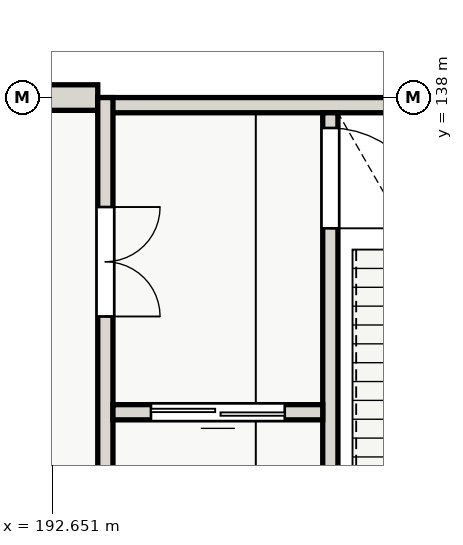
"""IFC4 building model, lengths in metres.
Left out: names, types, materials, properties, quantities, classifications, styles, units other than length and angle.
Written with IfcOpenShell. Run it as: python <this file> out.ifc"""

import sys

from ifc_helpers import new_model, si_unit, direction, frame, frame_2d, origin, place, context, subcontext, project, spatial, rectangle, extrude, element, fill, save


model = new_model("IFC4")
c1 = context("Model", 3, precision=1e-05, world=origin(), true_north=direction((0.0, 1.0)))
c2 = subcontext(c1, "Body", "Model", "MODEL_VIEW")
j1 = project(units=[si_unit("LENGTHUNIT", "METRE"), si_unit("PLANEANGLEUNIT", "RADIAN")], contexts=[c1])
p1 = place(None, origin())
s1 = spatial("IfcSite", under=j1, at=p1, CompositionType="ELEMENT")
p2 = place(p1, origin())
s2 = spatial("IfcBuilding", under=s1, at=p2, CompositionType="ELEMENT")
p3 = place(p2, frame((0.0, 0.0, 8.4)))
s3 = spatial("IfcBuildingStorey", under=s2, at=p3, CompositionType="ELEMENT", Elevation=8.4)
p4 = place(p3, frame((192.0, 138.0, 0.0), z_axis=(0.0, 0.0, 1.0), x_axis=(1.0, 0.0, 0.0)))
e1 = element("IfcWall", 1, at=p4, inside=s3, PredefinedType="SOLIDWALL", context=c2, shape_type="SweptSolid", body=[
    extrude(rectangle(XDim=1.4, YDim=0.42, at=frame_2d((0.7, 0.0))), origin(), (0.0, 0.0, 1.0), 3.58),
])
p5 = place(p3, frame((193.4, 137.875, 0.0), z_axis=(0.0, 0.0, 1.0), x_axis=(1.0, 0.0, 0.0)))
e2 = element("IfcWall", 2, at=p5, inside=s3, PredefinedType="SHEAR", context=c2, shape_type="SweptSolid", body=[
    extrude(rectangle(XDim=9.2, YDim=0.25, at=frame_2d((4.6, 0.0))), origin(), (0.0, 0.0, 1.0), 4.2),
])
p6 = place(p3, frame((193.525, 138.0, 0.0), z_axis=(0.0, 0.0, 1.0), x_axis=(0.0, -1.0, 0.0)))
e3 = element("IfcWall", 3, at=p6, inside=s3, PredefinedType="SHEAR", context=c2, shape_type="SweptSolid", body=[
    extrude(rectangle(XDim=9.2, YDim=0.25, at=frame_2d((4.6, 0.0))), origin(), (0.0, 0.0, 1.0), 4.2),
])
p7 = place(p6, frame((1.8, 0.0, 0.0)))
e4 = element("IfcOpeningElement", 4, at=p7, cuts=e3, PredefinedType="OPENING", context=c2, shape_type="SweptSolid", body=[
    extrude(rectangle(XDim=1.8, YDim=2.15, at=frame_2d((0.9, 1.075))), frame((0.0, 0.135, 0.0), z_axis=(0.0, -1.0, 0.0), x_axis=(1.0, 0.0, 0.0)), (0.0, 0.0, 1.0), 0.27),
])
p8 = place(p3, frame((197.225, 137.75, 0.0), z_axis=(0.0, 0.0, 1.0), x_axis=(0.0, -1.0, 0.0)))
e5 = element("IfcWall", 5, at=p8, inside=s3, PredefinedType="SHEAR", context=c2, shape_type="SweptSolid", body=[
    extrude(rectangle(XDim=8.7, YDim=0.25, at=frame_2d((4.35, 0.0))), origin(), (0.0, 0.0, 1.0), 4.2),
])
p9 = place(p8, frame((0.25, 0.0, 0.0)))
e6 = element("IfcOpeningElement", 6, at=p9, cuts=e5, PredefinedType="OPENING", context=c2, shape_type="SweptSolid", body=[
    extrude(rectangle(XDim=1.65, YDim=2.1, at=frame_2d((0.825, 1.05))), frame((0.0, 0.135, 0.0), z_axis=(0.0, -1.0, 0.0), x_axis=(1.0, 0.0, 0.0)), (0.0, 0.0, 1.0), 0.27),
])
p10 = place(p3, frame((197.1, 132.825, 0.0), z_axis=(0.0, 0.0, 1.0), x_axis=(-1.0, 0.0, 0.0)))
e7 = element("IfcWall", 7, at=p10, inside=s3, PredefinedType="SHEAR", context=c2, shape_type="SweptSolid", body=[
    extrude(rectangle(XDim=3.45, YDim=0.25, at=frame_2d((1.725, 0.0))), origin(), (0.0, 0.0, 1.0), 4.2),
])
p11 = place(p10, frame((0.625, 0.0, 0.0)))
e8 = element("IfcOpeningElement", 8, at=p11, cuts=e7, PredefinedType="OPENING", context=c2, shape_type="SweptSolid", body=[
    extrude(rectangle(XDim=2.2, YDim=2.35, at=frame_2d((1.1, 1.175))), frame((0.0, 0.135, 0.0), z_axis=(0.0, -1.0, 0.0), x_axis=(1.0, 0.0, 0.0)), (0.0, 0.0, 1.0), 0.27),
])
p12 = place(p7, origin())
e9 = element("IfcDoor", 9, at=p12, inside=s3, OperationType="DOUBLE_DOOR_SINGLE_SWING", PredefinedType="DOOR", context=c2, shape_type="SweptSolid", body=[
    extrude(rectangle(XDim=1.8, YDim=2.15, at=frame_2d((0.9, 1.075))), frame((0.0, 0.025, 0.0), z_axis=(0.0, -1.0, 0.0), x_axis=(1.0, 0.0, 0.0)), (0.0, 0.0, 1.0), 0.05),
])
fill(e4, e9)
p13 = place(p9, origin())
e10 = element("IfcDoor", 10, at=p13, inside=s3, OperationType="SINGLE_SWING_RIGHT", PredefinedType="DOOR", context=c2, shape_type="SweptSolid", body=[
    extrude(rectangle(XDim=1.65, YDim=2.1, at=frame_2d((0.825, 1.05))), frame((0.0, 0.025, 0.0), z_axis=(0.0, -1.0, 0.0), x_axis=(1.0, 0.0, 0.0)), (0.0, 0.0, 1.0), 0.05),
])
fill(e6, e10)
p14 = place(p11, origin())
e11 = element("IfcDoor", 11, at=p14, inside=s3, OperationType="SLIDING_TO_RIGHT", PredefinedType="DOOR", context=c2, shape_type="SweptSolid", body=[
    extrude(rectangle(XDim=2.2, YDim=2.35, at=frame_2d((1.1, 1.175))), frame((0.0, 0.025, 0.0), z_axis=(0.0, -1.0, 0.0), x_axis=(1.0, 0.0, 0.0)), (0.0, 0.0, 1.0), 0.05),
])
fill(e8, e11)
save(model, sys.argv[1])
